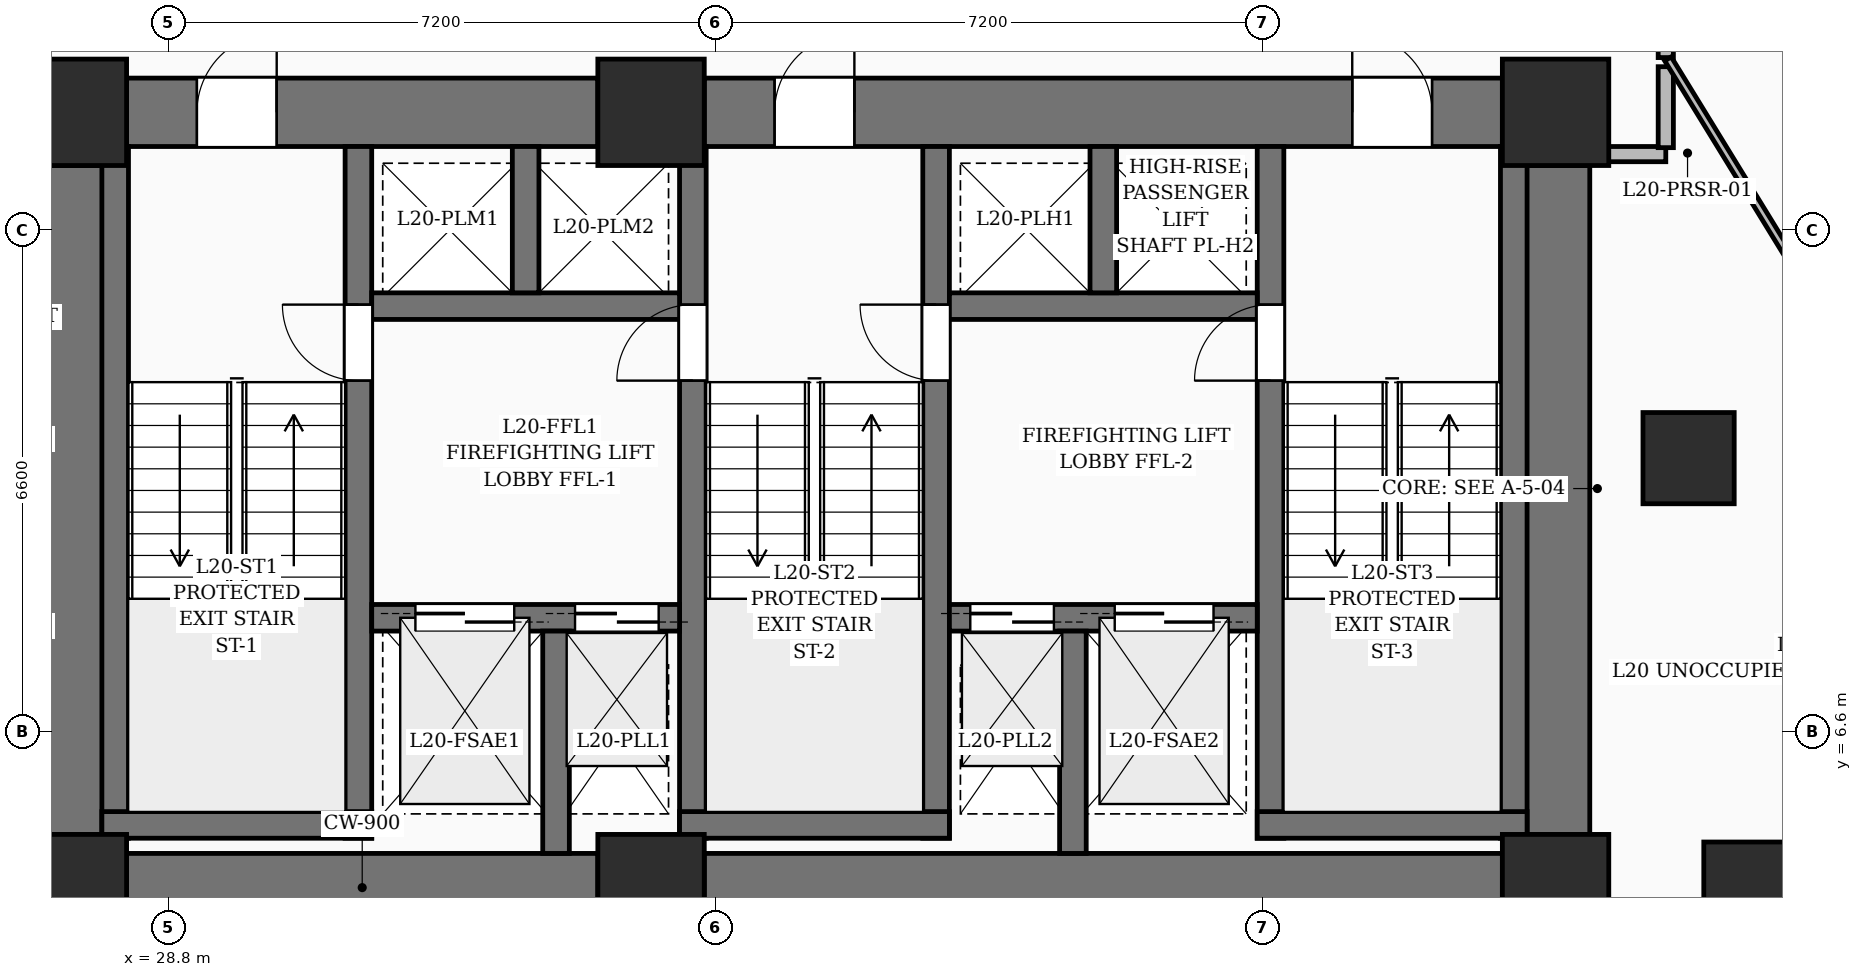
"""IFC4 building model, lengths in metres.
Left out: names, types, materials, properties, quantities, classifications, styles, units other than length and angle.
Written with IfcOpenShell. Run it as: python <this file> out.ifc"""

import sys

from ifc_helpers import new_model, si_unit, direction, frame, frame_2d, origin, origin_2d, place, context, subcontext, project, spatial, rectangle, extrude, element, fill, save


model = new_model("IFC4")
c1 = context("Model", 3, precision=1e-05, world=origin(), true_north=direction((0.0, 1.0)))
c2 = subcontext(c1, "Body", "Model", "MODEL_VIEW")
j1 = project(units=[si_unit("LENGTHUNIT", "METRE"), si_unit("PLANEANGLEUNIT", "RADIAN")], contexts=[c1])
p1 = place(None, origin())
s1 = spatial("IfcSite", under=j1, at=p1, CompositionType="ELEMENT")
p2 = place(p1, origin())
s2 = spatial("IfcBuilding", under=s1, at=p2, CompositionType="ELEMENT")
p3 = place(p2, frame((0.0, 0.0, 82.2)))
s3 = spatial("IfcBuildingStorey", under=s2, at=p3, CompositionType="ELEMENT", Elevation=82.2)
for number, where, z_axis, x_axis in (
    (1, (27.55, 4.55, 0.0), (0.0, 0.0, 1.0), (1.0, 0.0, 0.0)),
    (2, (35.15, 4.55, 0.0), (0.0, 0.0, 1.0), (1.0, 0.0, 0.0)),
    (3, (47.05, 4.55, 0.0), (0.0, 0.0, 1.0), (1.0, 0.0, 0.0)),
    (4, (27.55, 14.75, 0.0), (0.0, 0.0, 1.0), (1.0, 0.0, 0.0)),
    (5, (35.15, 14.75, 0.0), (0.0, 0.0, 1.0), (1.0, 0.0, 0.0)),
    (6, (47.05, 14.75, 0.0), (0.0, 0.0, 1.0), (1.0, 0.0, 0.0)),
):
    element("IfcColumn", number, at=place(p3, frame(where, z_axis=z_axis, x_axis=x_axis)), inside=s3, PredefinedType="COLUMN", context=c2, shape_type="SweptSolid", body=[
        extrude(rectangle(XDim=1.4, YDim=1.4, at=origin_2d()), origin(), (0.0, 0.0, 1.0), 3.6),
    ])
for number, where, z_axis, x_axis in (
    (7, (49.6, 4.55, 0.0), (0.0, 0.0, 1.0), (1.0, 0.0, 0.0)),
    (8, (48.8, 10.2, 0.0), (0.0, 0.0, 1.0), (1.0, 0.0, 0.0)),
):
    element("IfcColumn", number, at=place(p3, frame(where, z_axis=z_axis, x_axis=x_axis)), inside=s3, PredefinedType="COLUMN", context=c2, shape_type="SweptSolid", body=[
        extrude(rectangle(XDim=1.2, YDim=1.2, at=origin_2d()), origin(), (0.0, 0.0, 1.0), 3.6),
    ])
p4 = place(p3, frame((28.25, 4.55, 0.0), z_axis=(0.0, 0.0, 1.0), x_axis=(1.0, 0.0, 0.0)))
e9 = element("IfcWall", 9, at=p4, inside=s3, PredefinedType="SHEAR", context=c2, shape_type="SweptSolid", body=[
    extrude(rectangle(XDim=6.2, YDim=0.9, at=frame_2d((3.1, 0.0))), origin(), (0.0, 0.0, 1.0), 3.6),
])
p5 = place(p3, frame((35.85, 4.55, 0.0), z_axis=(0.0, 0.0, 1.0), x_axis=(1.0, 0.0, 0.0)))
e10 = element("IfcWall", 10, at=p5, inside=s3, PredefinedType="SHEAR", context=c2, shape_type="SweptSolid", body=[
    extrude(rectangle(XDim=10.5, YDim=0.9, at=frame_2d((5.25, 0.0))), origin(), (0.0, 0.0, 1.0), 3.6),
])
p6 = place(p3, frame((28.25, 14.75, 0.0), z_axis=(0.0, 0.0, 1.0), x_axis=(1.0, 0.0, 0.0)))
e11 = element("IfcWall", 11, at=p6, inside=s3, PredefinedType="SHEAR", context=c2, shape_type="SweptSolid", body=[
    extrude(rectangle(XDim=6.2, YDim=0.9, at=frame_2d((3.1, 0.0))), origin(), (0.0, 0.0, 1.0), 3.6),
])
p7 = place(p6, frame((0.925, 0.0, 0.0)))
e12 = element("IfcOpeningElement", 12, at=p7, cuts=e11, PredefinedType="OPENING", context=c2, shape_type="SweptSolid", body=[
    extrude(rectangle(XDim=1.05, YDim=2.15, at=frame_2d((0.525, 1.075))), frame((0.0, 0.46, 0.0), z_axis=(0.0, -1.0, 0.0), x_axis=(1.0, 0.0, 0.0)), (0.0, 0.0, 1.0), 0.92),
])
p8 = place(p3, frame((35.85, 14.75, 0.0), z_axis=(0.0, 0.0, 1.0), x_axis=(1.0, 0.0, 0.0)))
e13 = element("IfcWall", 13, at=p8, inside=s3, PredefinedType="SHEAR", context=c2, shape_type="SweptSolid", body=[
    extrude(rectangle(XDim=10.5, YDim=0.9, at=frame_2d((5.25, 0.0))), origin(), (0.0, 0.0, 1.0), 3.6),
])
p9 = place(p8, frame((0.925, 0.0, 0.0)))
e14 = element("IfcOpeningElement", 14, at=p9, cuts=e13, PredefinedType="OPENING", context=c2, shape_type="SweptSolid", body=[
    extrude(rectangle(XDim=1.05, YDim=2.15, at=frame_2d((0.525, 1.075))), frame((0.0, 0.46, 0.0), z_axis=(0.0, -1.0, 0.0), x_axis=(1.0, 0.0, 0.0)), (0.0, 0.0, 1.0), 0.92),
])
p10 = place(p8, frame((8.525, 0.0, 0.0)))
e15 = element("IfcOpeningElement", 15, at=p10, cuts=e13, PredefinedType="OPENING", context=c2, shape_type="SweptSolid", body=[
    extrude(rectangle(XDim=1.05, YDim=2.15, at=frame_2d((0.525, 1.075))), frame((0.0, 0.46, 0.0), z_axis=(0.0, -1.0, 0.0), x_axis=(1.0, 0.0, 0.0)), (0.0, 0.0, 1.0), 0.92),
])
for number, where, z_axis, x_axis in (
    (16, (27.55, 5.25, 0.0), (0.0, 0.0, 1.0), (0.0, 1.0, 0.0)),
    (17, (47.05, 5.25, 0.0), (0.0, 0.0, 1.0), (0.0, 1.0, 0.0)),
):
    element("IfcWall", number, at=place(p3, frame(where, z_axis=z_axis, x_axis=x_axis)), inside=s3, PredefinedType="SHEAR", context=c2, shape_type="SweptSolid", body=[
        extrude(rectangle(XDim=8.8, YDim=0.9, at=frame_2d((4.4, 0.0))), origin(), (0.0, 0.0, 1.0), 3.6),
    ])
p11 = place(p3, frame((28.1, 5.2, 0.0), z_axis=(0.0, 0.0, 1.0), x_axis=(0.0, 1.0, 0.0)))
e18 = element("IfcWall", 18, at=p11, inside=s3, PredefinedType="SOLIDWALL", context=c2, shape_type="SweptSolid", body=[
    extrude(rectangle(XDim=9.1, YDim=0.35, at=frame_2d((4.55, 0.0))), origin(), (0.0, 0.0, 1.0), 3.6),
])
p12 = place(p3, frame((31.3, 5.2, 0.0), z_axis=(0.0, 0.0, 1.0), x_axis=(0.0, 1.0, 0.0)))
e19 = element("IfcWall", 19, at=p12, inside=s3, PredefinedType="SOLIDWALL", context=c2, shape_type="SweptSolid", body=[
    extrude(rectangle(XDim=9.1, YDim=0.35, at=frame_2d((4.55, 0.0))), origin(), (0.0, 0.0, 1.0), 3.6),
])
p13 = place(p12, frame((6.02, 0.0, 0.0)))
e20 = element("IfcOpeningElement", 20, at=p13, cuts=e19, PredefinedType="OPENING", context=c2, shape_type="SweptSolid", body=[
    extrude(rectangle(XDim=1.0, YDim=2.15, at=frame_2d((0.5, 1.075))), frame((0.0, 0.185, 0.0), z_axis=(0.0, -1.0, 0.0), x_axis=(1.0, 0.0, 0.0)), (0.0, 0.0, 1.0), 0.37),
])
p14 = place(p3, frame((27.925, 5.375, 0.0), z_axis=(0.0, 0.0, 1.0), x_axis=(1.0, 0.0, 0.0)))
e21 = element("IfcWall", 21, at=p14, inside=s3, PredefinedType="SOLIDWALL", context=c2, shape_type="SweptSolid", body=[
    extrude(rectangle(XDim=3.55, YDim=0.35, at=frame_2d((1.775, 0.0))), origin(), (0.0, 0.0, 1.0), 3.6),
])
p15 = place(p3, frame((35.7, 5.2, 0.0), z_axis=(0.0, 0.0, 1.0), x_axis=(0.0, 1.0, 0.0)))
e22 = element("IfcWall", 22, at=p15, inside=s3, PredefinedType="SOLIDWALL", context=c2, shape_type="SweptSolid", body=[
    extrude(rectangle(XDim=9.1, YDim=0.35, at=frame_2d((4.55, 0.0))), origin(), (0.0, 0.0, 1.0), 3.6),
])
p16 = place(p15, frame((6.02, 0.0, 0.0)))
e23 = element("IfcOpeningElement", 23, at=p16, cuts=e22, PredefinedType="OPENING", context=c2, shape_type="SweptSolid", body=[
    extrude(rectangle(XDim=1.0, YDim=2.15, at=frame_2d((0.5, 1.075))), frame((0.0, 0.185, 0.0), z_axis=(0.0, -1.0, 0.0), x_axis=(1.0, 0.0, 0.0)), (0.0, 0.0, 1.0), 0.37),
])
p17 = place(p3, frame((38.9, 5.2, 0.0), z_axis=(0.0, 0.0, 1.0), x_axis=(0.0, 1.0, 0.0)))
e24 = element("IfcWall", 24, at=p17, inside=s3, PredefinedType="SOLIDWALL", context=c2, shape_type="SweptSolid", body=[
    extrude(rectangle(XDim=9.1, YDim=0.35, at=frame_2d((4.55, 0.0))), origin(), (0.0, 0.0, 1.0), 3.6),
])
p18 = place(p17, frame((6.02, 0.0, 0.0)))
e25 = element("IfcOpeningElement", 25, at=p18, cuts=e24, PredefinedType="OPENING", context=c2, shape_type="SweptSolid", body=[
    extrude(rectangle(XDim=1.0, YDim=2.15, at=frame_2d((0.5, 1.075))), frame((0.0, 0.185, 0.0), z_axis=(0.0, -1.0, 0.0), x_axis=(1.0, 0.0, 0.0)), (0.0, 0.0, 1.0), 0.37),
])
p19 = place(p3, frame((35.525, 5.375, 0.0), z_axis=(0.0, 0.0, 1.0), x_axis=(1.0, 0.0, 0.0)))
e26 = element("IfcWall", 26, at=p19, inside=s3, PredefinedType="SOLIDWALL", context=c2, shape_type="SweptSolid", body=[
    extrude(rectangle(XDim=3.55, YDim=0.35, at=frame_2d((1.775, 0.0))), origin(), (0.0, 0.0, 1.0), 3.6),
])
p20 = place(p3, frame((43.3, 5.2, 0.0), z_axis=(0.0, 0.0, 1.0), x_axis=(0.0, 1.0, 0.0)))
e27 = element("IfcWall", 27, at=p20, inside=s3, PredefinedType="SOLIDWALL", context=c2, shape_type="SweptSolid", body=[
    extrude(rectangle(XDim=9.1, YDim=0.35, at=frame_2d((4.55, 0.0))), origin(), (0.0, 0.0, 1.0), 3.6),
])
p21 = place(p20, frame((6.02, 0.0, 0.0)))
e28 = element("IfcOpeningElement", 28, at=p21, cuts=e27, PredefinedType="OPENING", context=c2, shape_type="SweptSolid", body=[
    extrude(rectangle(XDim=1.0, YDim=2.15, at=frame_2d((0.5, 1.075))), frame((0.0, 0.185, 0.0), z_axis=(0.0, -1.0, 0.0), x_axis=(1.0, 0.0, 0.0)), (0.0, 0.0, 1.0), 0.37),
])
p22 = place(p3, frame((46.5, 5.2, 0.0), z_axis=(0.0, 0.0, 1.0), x_axis=(0.0, 1.0, 0.0)))
e29 = element("IfcWall", 29, at=p22, inside=s3, PredefinedType="SOLIDWALL", context=c2, shape_type="SweptSolid", body=[
    extrude(rectangle(XDim=9.1, YDim=0.35, at=frame_2d((4.55, 0.0))), origin(), (0.0, 0.0, 1.0), 3.6),
])
p23 = place(p3, frame((43.125, 5.375, 0.0), z_axis=(0.0, 0.0, 1.0), x_axis=(1.0, 0.0, 0.0)))
e30 = element("IfcWall", 30, at=p23, inside=s3, PredefinedType="SOLIDWALL", context=c2, shape_type="SweptSolid", body=[
    extrude(rectangle(XDim=3.55, YDim=0.35, at=frame_2d((1.775, 0.0))), origin(), (0.0, 0.0, 1.0), 3.6),
])
p24 = place(p3, frame((31.475, 8.1, 0.0), z_axis=(0.0, 0.0, 1.0), x_axis=(1.0, 0.0, 0.0)))
e31 = element("IfcWall", 31, at=p24, inside=s3, PredefinedType="SOLIDWALL", context=c2, shape_type="SweptSolid", body=[
    extrude(rectangle(XDim=4.05, YDim=0.35, at=frame_2d((2.025, 0.0))), origin(), (0.0, 0.0, 1.0), 3.6),
])
p25 = place(p24, frame((0.575, 0.0, 0.0)))
e32 = element("IfcOpeningElement", 32, at=p25, cuts=e31, PredefinedType="OPENING", context=c2, shape_type="SweptSolid", body=[
    extrude(rectangle(XDim=1.3, YDim=2.25, at=frame_2d((0.65, 1.125))), frame((0.0, 0.185, 0.0), z_axis=(0.0, -1.0, 0.0), x_axis=(1.0, 0.0, 0.0)), (0.0, 0.0, 1.0), 0.37),
])
p26 = place(p24, frame((2.675, 0.0, 0.0)))
e33 = element("IfcOpeningElement", 33, at=p26, cuts=e31, PredefinedType="OPENING", context=c2, shape_type="SweptSolid", body=[
    extrude(rectangle(XDim=1.1, YDim=2.2, at=frame_2d((0.55, 1.1))), frame((0.0, 0.185, 0.0), z_axis=(0.0, -1.0, 0.0), x_axis=(1.0, 0.0, 0.0)), (0.0, 0.0, 1.0), 0.37),
])
p27 = place(p3, frame((39.075, 8.1, 0.0), z_axis=(0.0, 0.0, 1.0), x_axis=(1.0, 0.0, 0.0)))
e34 = element("IfcWall", 34, at=p27, inside=s3, PredefinedType="SOLIDWALL", context=c2, shape_type="SweptSolid", body=[
    extrude(rectangle(XDim=4.05, YDim=0.35, at=frame_2d((2.025, 0.0))), origin(), (0.0, 0.0, 1.0), 3.6),
])
p28 = place(p27, frame((2.175, 0.0, 0.0)))
e35 = element("IfcOpeningElement", 35, at=p28, cuts=e34, PredefinedType="OPENING", context=c2, shape_type="SweptSolid", body=[
    extrude(rectangle(XDim=1.3, YDim=2.25, at=frame_2d((0.65, 1.125))), frame((0.0, 0.185, 0.0), z_axis=(0.0, -1.0, 0.0), x_axis=(1.0, 0.0, 0.0)), (0.0, 0.0, 1.0), 0.37),
])
p29 = place(p27, frame((0.275, 0.0, 0.0)))
e36 = element("IfcOpeningElement", 36, at=p29, cuts=e34, PredefinedType="OPENING", context=c2, shape_type="SweptSolid", body=[
    extrude(rectangle(XDim=1.1, YDim=2.2, at=frame_2d((0.55, 1.1))), frame((0.0, 0.185, 0.0), z_axis=(0.0, -1.0, 0.0), x_axis=(1.0, 0.0, 0.0)), (0.0, 0.0, 1.0), 0.37),
])
for number, where, z_axis, x_axis in (
    (37, (33.9, 5.0, 0.0), (0.0, 0.0, 1.0), (0.0, 1.0, 0.0)),
    (38, (40.7, 5.0, 0.0), (0.0, 0.0, 1.0), (0.0, 1.0, 0.0)),
):
    element("IfcWall", number, at=place(p3, frame(where, z_axis=z_axis, x_axis=x_axis)), inside=s3, PredefinedType="SOLIDWALL", context=c2, shape_type="SweptSolid", body=[
        extrude(rectangle(XDim=2.925, YDim=0.35, at=frame_2d((1.462, 0.0))), origin(), (0.0, 0.0, 1.0), 3.6),
    ])
p30 = place(p3, frame((31.475, 12.2, 0.0), z_axis=(0.0, 0.0, 1.0), x_axis=(1.0, 0.0, 0.0)))
e39 = element("IfcWall", 39, at=p30, inside=s3, PredefinedType="SOLIDWALL", context=c2, shape_type="SweptSolid", body=[
    extrude(rectangle(XDim=4.05, YDim=0.35, at=frame_2d((2.025, 0.0))), origin(), (0.0, 0.0, 1.0), 3.6),
])
p31 = place(p3, frame((33.5, 12.375, 0.0), z_axis=(0.0, 0.0, 1.0), x_axis=(0.0, 1.0, 0.0)))
e40 = element("IfcWall", 40, at=p31, inside=s3, PredefinedType="SOLIDWALL", context=c2, shape_type="SweptSolid", body=[
    extrude(rectangle(XDim=1.925, YDim=0.35, at=frame_2d((0.962, 0.0))), origin(), (0.0, 0.0, 1.0), 3.6),
])
p32 = place(p3, frame((39.075, 12.2, 0.0), z_axis=(0.0, 0.0, 1.0), x_axis=(1.0, 0.0, 0.0)))
e41 = element("IfcWall", 41, at=p32, inside=s3, PredefinedType="SOLIDWALL", context=c2, shape_type="SweptSolid", body=[
    extrude(rectangle(XDim=4.05, YDim=0.35, at=frame_2d((2.025, 0.0))), origin(), (0.0, 0.0, 1.0), 3.6),
])
p33 = place(p3, frame((41.1, 12.375, 0.0), z_axis=(0.0, 0.0, 1.0), x_axis=(0.0, 1.0, 0.0)))
e42 = element("IfcWall", 42, at=p33, inside=s3, PredefinedType="SOLIDWALL", context=c2, shape_type="SweptSolid", body=[
    extrude(rectangle(XDim=1.925, YDim=0.35, at=frame_2d((0.962, 0.0))), origin(), (0.0, 0.0, 1.0), 3.6),
])
p34 = place(p3, frame((47.5, 14.2, 0.0), z_axis=(0.0, 0.0, 1.0), x_axis=(1.0, 0.0, 0.0)))
e43 = element("IfcWall", 43, at=p34, inside=s3, PredefinedType="PARTITIONING", context=c2, shape_type="SweptSolid", body=[
    extrude(rectangle(XDim=1.0, YDim=0.2, at=frame_2d((0.5, 0.0))), origin(), (0.0, 0.0, 1.0), 3.35),
])
p35 = place(p3, frame((48.5, 14.285, 0.0), z_axis=(0.0, 0.0, 1.0), x_axis=(0.0, 1.0, 0.0)))
e44 = element("IfcWall", 44, at=p35, inside=s3, PredefinedType="PARTITIONING", context=c2, shape_type="SweptSolid", body=[
    extrude(rectangle(XDim=1.065, YDim=0.2, at=frame_2d((0.533, 0.0))), origin(), (0.0, 0.0, 1.0), 3.35),
])
p36 = place(p3, frame((48.5, 15.47, 0.0), z_axis=(0.0, 0.0, 1.0), x_axis=(0.0, 1.0, 0.0)))
e45 = element("IfcWall", 45, at=p36, inside=s3, PredefinedType="PARTITIONING", context=c2, shape_type="SweptSolid", body=[
    extrude(rectangle(XDim=2.28, YDim=0.2, at=frame_2d((1.14, 0.0))), origin(), (0.0, 0.0, 1.0), 2.345),
])
p37 = place(p36, frame((0.69, 0.0, 0.0)))
e46 = element("IfcOpeningElement", 46, at=p37, cuts=e45, PredefinedType="OPENING", context=c2, shape_type="SweptSolid", body=[
    extrude(rectangle(XDim=0.9, YDim=2.1, at=frame_2d((0.45, 1.05))), frame((0.0, 0.11, 0.0), z_axis=(0.0, -1.0, 0.0), x_axis=(1.0, 0.0, 0.0)), (0.0, 0.0, 1.0), 0.22),
])
p38 = place(p3, frame((48.529, 15.453, 0.0), z_axis=(0.0, 0.0, 1.0), x_axis=(0.52306290803, -0.852294077325, 0.0)))
e47 = element("IfcWall", 47, at=p38, inside=s3, PredefinedType="PARTITIONING", context=c2, shape_type="SweptSolid", body=[
    extrude(rectangle(XDim=15.885, YDim=0.1, at=frame_2d((7.943, 0.0))), origin(), (0.0, 0.0, 1.0), 2.345),
])
p39 = place(p7, origin())
e48 = element("IfcDoor", 48, at=p39, inside=s3, OperationType="SINGLE_SWING_RIGHT", PredefinedType="DOOR", context=c2, shape_type="SweptSolid", body=[
    extrude(rectangle(XDim=1.05, YDim=2.15, at=frame_2d((0.525, 1.075))), frame((0.0, 0.025, 0.0), z_axis=(0.0, -1.0, 0.0), x_axis=(1.0, 0.0, 0.0)), (0.0, 0.0, 1.0), 0.05),
])
fill(e12, e48)
p40 = place(p9, origin())
e49 = element("IfcDoor", 49, at=p40, inside=s3, OperationType="SINGLE_SWING_RIGHT", PredefinedType="DOOR", context=c2, shape_type="SweptSolid", body=[
    extrude(rectangle(XDim=1.05, YDim=2.15, at=frame_2d((0.525, 1.075))), frame((0.0, 0.025, 0.0), z_axis=(0.0, -1.0, 0.0), x_axis=(1.0, 0.0, 0.0)), (0.0, 0.0, 1.0), 0.05),
])
fill(e14, e49)
p41 = place(p10, origin())
e50 = element("IfcDoor", 50, at=p41, inside=s3, OperationType="SINGLE_SWING_LEFT", PredefinedType="DOOR", context=c2, shape_type="SweptSolid", body=[
    extrude(rectangle(XDim=1.05, YDim=2.15, at=frame_2d((0.525, 1.075))), frame((0.0, 0.025, 0.0), z_axis=(0.0, -1.0, 0.0), x_axis=(1.0, 0.0, 0.0)), (0.0, 0.0, 1.0), 0.05),
])
fill(e15, e50)
p42 = place(p13, origin())
e51 = element("IfcDoor", 51, at=p42, inside=s3, OperationType="SINGLE_SWING_RIGHT", PredefinedType="DOOR", context=c2, shape_type="SweptSolid", body=[
    extrude(rectangle(XDim=1.0, YDim=2.15, at=frame_2d((0.5, 1.075))), frame((0.0, 0.025, 0.0), z_axis=(0.0, -1.0, 0.0), x_axis=(1.0, 0.0, 0.0)), (0.0, 0.0, 1.0), 0.05),
])
fill(e20, e51)
p43 = place(p16, origin())
e52 = element("IfcDoor", 52, at=p43, inside=s3, OperationType="SINGLE_SWING_LEFT", PredefinedType="DOOR", context=c2, shape_type="SweptSolid", body=[
    extrude(rectangle(XDim=1.0, YDim=2.15, at=frame_2d((0.5, 1.075))), frame((0.0, 0.025, 0.0), z_axis=(0.0, -1.0, 0.0), x_axis=(1.0, 0.0, 0.0)), (0.0, 0.0, 1.0), 0.05),
])
fill(e23, e52)
p44 = place(p18, origin())
e53 = element("IfcDoor", 53, at=p44, inside=s3, OperationType="SINGLE_SWING_RIGHT", PredefinedType="DOOR", context=c2, shape_type="SweptSolid", body=[
    extrude(rectangle(XDim=1.0, YDim=2.15, at=frame_2d((0.5, 1.075))), frame((0.0, 0.025, 0.0), z_axis=(0.0, -1.0, 0.0), x_axis=(1.0, 0.0, 0.0)), (0.0, 0.0, 1.0), 0.05),
])
fill(e25, e53)
p45 = place(p21, origin())
e54 = element("IfcDoor", 54, at=p45, inside=s3, OperationType="SINGLE_SWING_LEFT", PredefinedType="DOOR", context=c2, shape_type="SweptSolid", body=[
    extrude(rectangle(XDim=1.0, YDim=2.15, at=frame_2d((0.5, 1.075))), frame((0.0, 0.025, 0.0), z_axis=(0.0, -1.0, 0.0), x_axis=(1.0, 0.0, 0.0)), (0.0, 0.0, 1.0), 0.05),
])
fill(e28, e54)
p46 = place(p25, origin())
e55 = element("IfcDoor", 55, at=p46, inside=s3, OperationType="DOUBLE_DOOR_SLIDING", PredefinedType="DOOR", context=c2, shape_type="SweptSolid", body=[
    extrude(rectangle(XDim=1.3, YDim=2.25, at=frame_2d((0.65, 1.125))), frame((0.0, 0.025, 0.0), z_axis=(0.0, -1.0, 0.0), x_axis=(1.0, 0.0, 0.0)), (0.0, 0.0, 1.0), 0.05),
])
fill(e32, e55)
p47 = place(p28, origin())
e56 = element("IfcDoor", 56, at=p47, inside=s3, OperationType="DOUBLE_DOOR_SLIDING", PredefinedType="DOOR", context=c2, shape_type="SweptSolid", body=[
    extrude(rectangle(XDim=1.3, YDim=2.25, at=frame_2d((0.65, 1.125))), frame((0.0, 0.025, 0.0), z_axis=(0.0, -1.0, 0.0), x_axis=(1.0, 0.0, 0.0)), (0.0, 0.0, 1.0), 0.05),
])
fill(e35, e56)
p48 = place(p26, origin())
e57 = element("IfcDoor", 57, at=p48, inside=s3, OperationType="DOUBLE_DOOR_SLIDING", PredefinedType="DOOR", context=c2, shape_type="SweptSolid", body=[
    extrude(rectangle(XDim=1.1, YDim=2.2, at=frame_2d((0.55, 1.1))), frame((0.0, 0.025, 0.0), z_axis=(0.0, -1.0, 0.0), x_axis=(1.0, 0.0, 0.0)), (0.0, 0.0, 1.0), 0.05),
])
fill(e33, e57)
p49 = place(p29, origin())
e58 = element("IfcDoor", 58, at=p49, inside=s3, OperationType="DOUBLE_DOOR_SLIDING", PredefinedType="DOOR", context=c2, shape_type="SweptSolid", body=[
    extrude(rectangle(XDim=1.1, YDim=2.2, at=frame_2d((0.55, 1.1))), frame((0.0, 0.025, 0.0), z_axis=(0.0, -1.0, 0.0), x_axis=(1.0, 0.0, 0.0)), (0.0, 0.0, 1.0), 0.05),
])
fill(e36, e58)
save(model, sys.argv[1])
